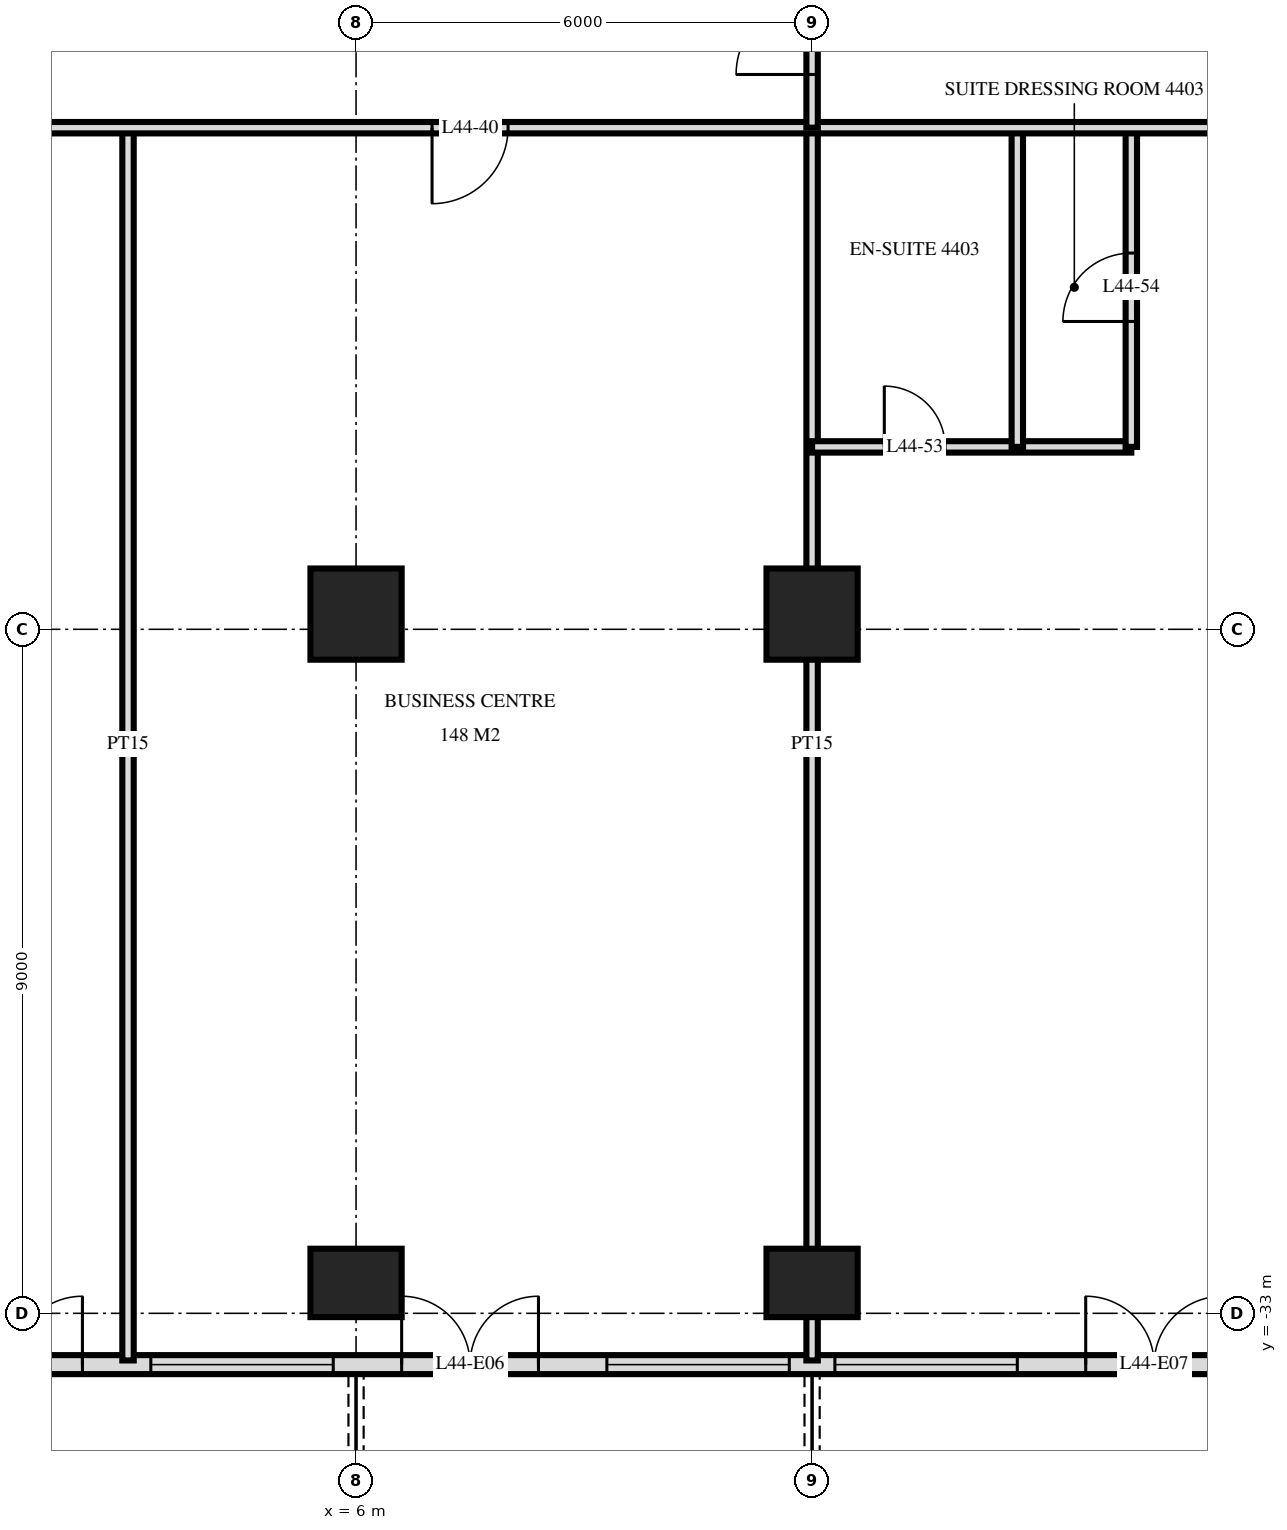
"""IFC4 building model, lengths in metres.
Left out: names, types, materials, properties, quantities, classifications, styles, units other than length and angle.
Written with IfcOpenShell. Run it as: python <this file> out.ifc"""

import sys

from ifc_helpers import new_model, si_unit, direction, frame, frame_2d, origin, origin_2d, place, context, subcontext, project, spatial, rectangle, extrude, element, fill, save


model = new_model("IFC4")
c1 = context("Model", 3, precision=1e-05, world=origin(), true_north=direction((0.0, 1.0)))
c2 = subcontext(c1, "Body", "Model", "MODEL_VIEW")
j1 = project(units=[si_unit("LENGTHUNIT", "METRE"), si_unit("PLANEANGLEUNIT", "RADIAN")], contexts=[c1])
p1 = place(None, origin())
s1 = spatial("IfcSite", under=j1, at=p1, CompositionType="ELEMENT")
p2 = place(p1, origin())
s2 = spatial("IfcBuilding", under=s1, at=p2, CompositionType="ELEMENT")
p3 = place(p2, frame((0.0, 0.0, 170.4)))
s3 = spatial("IfcBuildingStorey", under=s2, at=p3, CompositionType="ELEMENT", Elevation=170.4)
p4 = place(p3, frame((6.0, -32.6, 0.0), z_axis=(0.0, 0.0, 1.0), x_axis=(1.0, 0.0, 0.0)))
e1 = element("IfcColumn", 1, at=p4, inside=s3, PredefinedType="COLUMN", context=c2, shape_type="SweptSolid", body=[
    extrude(rectangle(XDim=1.2, YDim=0.9, at=origin_2d()), origin(), (0.0, 0.0, 1.0), 3.6),
])
p5 = place(p3, frame((6.0, -23.8, 0.0), z_axis=(0.0, 0.0, 1.0), x_axis=(1.0, 0.0, 0.0)))
e2 = element("IfcColumn", 2, at=p5, inside=s3, PredefinedType="COLUMN", context=c2, shape_type="SweptSolid", body=[
    extrude(rectangle(XDim=1.2, YDim=1.2, at=origin_2d()), origin(), (0.0, 0.0, 1.0), 3.6),
])
p6 = place(p3, frame((12.0, -32.6, 0.0), z_axis=(0.0, 0.0, 1.0), x_axis=(1.0, 0.0, 0.0)))
e3 = element("IfcColumn", 3, at=p6, inside=s3, PredefinedType="COLUMN", context=c2, shape_type="SweptSolid", body=[
    extrude(rectangle(XDim=1.2, YDim=0.9, at=origin_2d()), origin(), (0.0, 0.0, 1.0), 3.6),
])
p7 = place(p3, frame((12.0, -23.8, 0.0), z_axis=(0.0, 0.0, 1.0), x_axis=(1.0, 0.0, 0.0)))
e4 = element("IfcColumn", 4, at=p7, inside=s3, PredefinedType="COLUMN", context=c2, shape_type="SweptSolid", body=[
    extrude(rectangle(XDim=1.2, YDim=1.2, at=origin_2d()), origin(), (0.0, 0.0, 1.0), 3.6),
])
p8 = place(p3, frame((-23.675, -33.675, 0.0), z_axis=(0.0, 0.0, 1.0), x_axis=(1.0, 0.0, 0.0)))
e5 = element("IfcWall", 5, at=p8, inside=s3, PredefinedType="SOLIDWALL", context=c2, shape_type="SweptSolid", body=[
    extrude(rectangle(XDim=47.351, YDim=0.25, at=frame_2d((23.675, 0.0))), origin(), (0.0, 0.0, 1.0), 3.32),
])
p9 = place(p8, frame((0.575, 0.0, 0.0)))
e6 = element("IfcOpeningElement", 6, at=p9, cuts=e5, PredefinedType="OPENING", context=c2, shape_type="SweptSolid", body=[
    extrude(rectangle(XDim=1.8, YDim=2.4, at=frame_2d((0.9, 1.2))), frame((0.0, 0.135, 0.0), z_axis=(0.0, -1.0, 0.0), x_axis=(1.0, 0.0, 0.0)), (0.0, 0.0, 1.0), 0.27),
])
p10 = place(p8, frame((3.425, 0.0, 0.3)))
e7 = element("IfcOpeningElement", 7, at=p10, cuts=e5, PredefinedType="OPENING", context=c2, shape_type="SweptSolid", body=[
    extrude(rectangle(XDim=1.8, YDim=2.1, at=frame_2d((0.9, 1.05))), frame((0.0, 0.135, 0.0), z_axis=(0.0, -1.0, 0.0), x_axis=(1.0, 0.0, 0.0)), (0.0, 0.0, 1.0), 0.27),
])
p11 = place(p8, frame((5.975, 0.0, 0.3)))
e8 = element("IfcOpeningElement", 8, at=p11, cuts=e5, PredefinedType="OPENING", context=c2, shape_type="SweptSolid", body=[
    extrude(rectangle(XDim=2.4, YDim=2.1, at=frame_2d((1.2, 1.05))), frame((0.0, 0.135, 0.0), z_axis=(0.0, -1.0, 0.0), x_axis=(1.0, 0.0, 0.0)), (0.0, 0.0, 1.0), 0.27),
])
p12 = place(p8, frame((9.275, 0.0, 0.0)))
e9 = element("IfcOpeningElement", 9, at=p12, cuts=e5, PredefinedType="OPENING", context=c2, shape_type="SweptSolid", body=[
    extrude(rectangle(XDim=1.8, YDim=2.4, at=frame_2d((0.9, 1.2))), frame((0.0, 0.135, 0.0), z_axis=(0.0, -1.0, 0.0), x_axis=(1.0, 0.0, 0.0)), (0.0, 0.0, 1.0), 0.27),
])
p13 = place(p8, frame((12.275, 0.0, 0.0)))
e10 = element("IfcOpeningElement", 10, at=p13, cuts=e5, PredefinedType="OPENING", context=c2, shape_type="SweptSolid", body=[
    extrude(rectangle(XDim=1.8, YDim=2.4, at=frame_2d((0.9, 1.2))), frame((0.0, 0.135, 0.0), z_axis=(0.0, -1.0, 0.0), x_axis=(1.0, 0.0, 0.0)), (0.0, 0.0, 1.0), 0.27),
])
p14 = place(p8, frame((14.975, 0.0, 0.3)))
e11 = element("IfcOpeningElement", 11, at=p14, cuts=e5, PredefinedType="OPENING", context=c2, shape_type="SweptSolid", body=[
    extrude(rectangle(XDim=2.4, YDim=2.1, at=frame_2d((1.2, 1.05))), frame((0.0, 0.135, 0.0), z_axis=(0.0, -1.0, 0.0), x_axis=(1.0, 0.0, 0.0)), (0.0, 0.0, 1.0), 0.27),
])
p15 = place(p8, frame((17.975, 0.0, 0.3)))
e12 = element("IfcOpeningElement", 12, at=p15, cuts=e5, PredefinedType="OPENING", context=c2, shape_type="SweptSolid", body=[
    extrude(rectangle(XDim=2.4, YDim=2.1, at=frame_2d((1.2, 1.05))), frame((0.0, 0.135, 0.0), z_axis=(0.0, -1.0, 0.0), x_axis=(1.0, 0.0, 0.0)), (0.0, 0.0, 1.0), 0.27),
])
p16 = place(p8, frame((21.275, 0.0, 0.0)))
e13 = element("IfcOpeningElement", 13, at=p16, cuts=e5, PredefinedType="OPENING", context=c2, shape_type="SweptSolid", body=[
    extrude(rectangle(XDim=1.8, YDim=2.4, at=frame_2d((0.9, 1.2))), frame((0.0, 0.135, 0.0), z_axis=(0.0, -1.0, 0.0), x_axis=(1.0, 0.0, 0.0)), (0.0, 0.0, 1.0), 0.27),
])
p17 = place(p8, frame((24.275, 0.0, 0.0)))
e14 = element("IfcOpeningElement", 14, at=p17, cuts=e5, PredefinedType="OPENING", context=c2, shape_type="SweptSolid", body=[
    extrude(rectangle(XDim=1.8, YDim=2.4, at=frame_2d((0.9, 1.2))), frame((0.0, 0.135, 0.0), z_axis=(0.0, -1.0, 0.0), x_axis=(1.0, 0.0, 0.0)), (0.0, 0.0, 1.0), 0.27),
])
p18 = place(p8, frame((26.975, 0.0, 0.3)))
e15 = element("IfcOpeningElement", 15, at=p18, cuts=e5, PredefinedType="OPENING", context=c2, shape_type="SweptSolid", body=[
    extrude(rectangle(XDim=2.4, YDim=2.1, at=frame_2d((1.2, 1.05))), frame((0.0, 0.135, 0.0), z_axis=(0.0, -1.0, 0.0), x_axis=(1.0, 0.0, 0.0)), (0.0, 0.0, 1.0), 0.27),
])
p19 = place(p8, frame((30.275, 0.0, 0.0)))
e16 = element("IfcOpeningElement", 16, at=p19, cuts=e5, PredefinedType="OPENING", context=c2, shape_type="SweptSolid", body=[
    extrude(rectangle(XDim=1.8, YDim=2.4, at=frame_2d((0.9, 1.2))), frame((0.0, 0.135, 0.0), z_axis=(0.0, -1.0, 0.0), x_axis=(1.0, 0.0, 0.0)), (0.0, 0.0, 1.0), 0.27),
])
p20 = place(p8, frame((32.975, 0.0, 0.3)))
e17 = element("IfcOpeningElement", 17, at=p20, cuts=e5, PredefinedType="OPENING", context=c2, shape_type="SweptSolid", body=[
    extrude(rectangle(XDim=2.4, YDim=2.1, at=frame_2d((1.2, 1.05))), frame((0.0, 0.135, 0.0), z_axis=(0.0, -1.0, 0.0), x_axis=(1.0, 0.0, 0.0)), (0.0, 0.0, 1.0), 0.27),
])
p21 = place(p8, frame((35.975, 0.0, 0.3)))
e18 = element("IfcOpeningElement", 18, at=p21, cuts=e5, PredefinedType="OPENING", context=c2, shape_type="SweptSolid", body=[
    extrude(rectangle(XDim=2.4, YDim=2.1, at=frame_2d((1.2, 1.05))), frame((0.0, 0.135, 0.0), z_axis=(0.0, -1.0, 0.0), x_axis=(1.0, 0.0, 0.0)), (0.0, 0.0, 1.0), 0.27),
])
p22 = place(p8, frame((39.275, 0.0, 0.0)))
e19 = element("IfcOpeningElement", 19, at=p22, cuts=e5, PredefinedType="OPENING", context=c2, shape_type="SweptSolid", body=[
    extrude(rectangle(XDim=1.8, YDim=2.4, at=frame_2d((0.9, 1.2))), frame((0.0, 0.135, 0.0), z_axis=(0.0, -1.0, 0.0), x_axis=(1.0, 0.0, 0.0)), (0.0, 0.0, 1.0), 0.27),
])
p23 = place(p8, frame((42.275, 0.0, 0.0)))
e20 = element("IfcOpeningElement", 20, at=p23, cuts=e5, PredefinedType="OPENING", context=c2, shape_type="SweptSolid", body=[
    extrude(rectangle(XDim=1.8, YDim=2.4, at=frame_2d((0.9, 1.2))), frame((0.0, 0.135, 0.0), z_axis=(0.0, -1.0, 0.0), x_axis=(1.0, 0.0, 0.0)), (0.0, 0.0, 1.0), 0.27),
])
p24 = place(p8, frame((45.125, 0.0, 0.3)))
e21 = element("IfcOpeningElement", 21, at=p24, cuts=e5, PredefinedType="OPENING", context=c2, shape_type="SweptSolid", body=[
    extrude(rectangle(XDim=1.8, YDim=2.1, at=frame_2d((0.9, 1.05))), frame((0.0, 0.135, 0.0), z_axis=(0.0, -1.0, 0.0), x_axis=(1.0, 0.0, 0.0)), (0.0, 0.0, 1.0), 0.27),
])
p25 = place(p3, frame((16.2, -21.6, 0.0), z_axis=(0.0, 0.0, 1.0), x_axis=(0.0, 1.0, 0.0)))
e22 = element("IfcWall", 22, at=p25, inside=s3, PredefinedType="PARTITIONING", context=c2, shape_type="SweptSolid", body=[
    extrude(rectangle(XDim=4.2, YDim=0.15, at=frame_2d((2.1, 0.0))), origin(), (0.0, 0.0, 1.0), 3.32),
])
p26 = place(p25, frame((1.65, 0.0, 0.0)))
e23 = element("IfcOpeningElement", 23, at=p26, cuts=e22, PredefinedType="OPENING", context=c2, shape_type="SweptSolid", body=[
    extrude(rectangle(XDim=0.9, YDim=2.1, at=frame_2d((0.45, 1.05))), frame((0.0, 0.085, 0.0), z_axis=(0.0, -1.0, 0.0), x_axis=(1.0, 0.0, 0.0)), (0.0, 0.0, 1.0), 0.17),
])
p27 = place(p3, frame((14.7, -21.6, 0.0), z_axis=(0.0, 0.0, 1.0), x_axis=(0.0, 1.0, 0.0)))
e24 = element("IfcWall", 24, at=p27, inside=s3, PredefinedType="PARTITIONING", context=c2, shape_type="SweptSolid", body=[
    extrude(rectangle(XDim=4.2, YDim=0.15, at=frame_2d((2.1, 0.0))), origin(), (0.0, 0.0, 1.0), 3.32),
])
p28 = place(p3, frame((12.0, -17.4, 0.0), z_axis=(0.0, 0.0, 1.0), x_axis=(0.0, 1.0, 0.0)))
e25 = element("IfcWall", 25, at=p28, inside=s3, PredefinedType="PARTITIONING", context=c2, shape_type="SweptSolid", body=[
    extrude(rectangle(XDim=2.35, YDim=0.15, at=frame_2d((1.175, 0.0))), origin(), (0.0, 0.0, 1.0), 3.32),
])
p29 = place(p28, frame((0.7, 0.0, 0.0)))
e26 = element("IfcOpeningElement", 26, at=p29, cuts=e25, PredefinedType="OPENING", context=c2, shape_type="SweptSolid", body=[
    extrude(rectangle(XDim=1.0, YDim=2.1, at=frame_2d((0.5, 1.05))), frame((0.0, 0.085, 0.0), z_axis=(0.0, -1.0, 0.0), x_axis=(1.0, 0.0, 0.0)), (0.0, 0.0, 1.0), 0.17),
])
for number, where, z_axis, x_axis in (
    (27, (12.0, -33.62, 0.0), (0.0, 0.0, 1.0), (0.0, 1.0, 0.0)),
    (28, (3.0, -33.62, 0.0), (0.0, 0.0, 1.0), (0.0, 1.0, 0.0)),
):
    element("IfcWall", number, at=place(p3, frame(where, z_axis=z_axis, x_axis=x_axis)), inside=s3, PredefinedType="PARTITIONING", context=c2, shape_type="SweptSolid", body=[
        extrude(rectangle(XDim=16.22, YDim=0.15, at=frame_2d((8.11, 0.0))), origin(), (0.0, 0.0, 1.0), 3.32),
    ])
p30 = place(p3, frame((12.0, -21.6, 0.0), z_axis=(0.0, 0.0, 1.0), x_axis=(1.0, 0.0, 0.0)))
e29 = element("IfcWall", 29, at=p30, inside=s3, PredefinedType="PARTITIONING", context=c2, shape_type="SweptSolid", body=[
    extrude(rectangle(XDim=4.2, YDim=0.15, at=frame_2d((2.1, 0.0))), origin(), (0.0, 0.0, 1.0), 3.32),
])
p31 = place(p30, frame((0.95, 0.0, 0.0)))
e30 = element("IfcOpeningElement", 30, at=p31, cuts=e29, PredefinedType="OPENING", context=c2, shape_type="SweptSolid", body=[
    extrude(rectangle(XDim=0.8, YDim=2.1, at=frame_2d((0.4, 1.05))), frame((0.0, 0.085, 0.0), z_axis=(0.0, -1.0, 0.0), x_axis=(1.0, 0.0, 0.0)), (0.0, 0.0, 1.0), 0.17),
])
p32 = place(p3, frame((-28.02, -17.4, 0.0), z_axis=(0.0, 0.0, 1.0), x_axis=(1.0, 0.0, 0.0)))
e31 = element("IfcWall", 31, at=p32, inside=s3, PredefinedType="PARTITIONING", context=c2, shape_type="SweptSolid", body=[
    extrude(rectangle(XDim=56.04, YDim=0.15, at=frame_2d((28.02, 0.0))), origin(), (0.0, 0.0, 1.0), 3.32),
])
p33 = place(p32, frame((10.42, 0.0, 0.0)))
e32 = element("IfcOpeningElement", 32, at=p33, cuts=e31, PredefinedType="OPENING", context=c2, shape_type="SweptSolid", body=[
    extrude(rectangle(XDim=1.0, YDim=2.1, at=frame_2d((0.5, 1.05))), frame((0.0, 0.085, 0.0), z_axis=(0.0, -1.0, 0.0), x_axis=(1.0, 0.0, 0.0)), (0.0, 0.0, 1.0), 0.17),
])
p34 = place(p32, frame((2.32, 0.0, 0.0)))
e33 = element("IfcOpeningElement", 33, at=p34, cuts=e31, PredefinedType="OPENING", context=c2, shape_type="SweptSolid", body=[
    extrude(rectangle(XDim=1.0, YDim=2.1, at=frame_2d((0.5, 1.05))), frame((0.0, 0.085, 0.0), z_axis=(0.0, -1.0, 0.0), x_axis=(1.0, 0.0, 0.0)), (0.0, 0.0, 1.0), 0.17),
])
p35 = place(p32, frame((49.72, 0.0, 0.0)))
e34 = element("IfcOpeningElement", 34, at=p35, cuts=e31, PredefinedType="OPENING", context=c2, shape_type="SweptSolid", body=[
    extrude(rectangle(XDim=1.0, YDim=2.1, at=frame_2d((0.5, 1.05))), frame((0.0, 0.085, 0.0), z_axis=(0.0, -1.0, 0.0), x_axis=(1.0, 0.0, 0.0)), (0.0, 0.0, 1.0), 0.17),
])
p36 = place(p32, frame((23.02, 0.0, 0.0)))
e35 = element("IfcOpeningElement", 35, at=p36, cuts=e31, PredefinedType="OPENING", context=c2, shape_type="SweptSolid", body=[
    extrude(rectangle(XDim=1.0, YDim=2.1, at=frame_2d((0.5, 1.05))), frame((0.0, 0.085, 0.0), z_axis=(0.0, -1.0, 0.0), x_axis=(1.0, 0.0, 0.0)), (0.0, 0.0, 1.0), 0.17),
])
p37 = place(p32, frame((35.02, 0.0, 0.0)))
e36 = element("IfcOpeningElement", 36, at=p37, cuts=e31, PredefinedType="OPENING", context=c2, shape_type="SweptSolid", body=[
    extrude(rectangle(XDim=1.0, YDim=2.1, at=frame_2d((0.5, 1.05))), frame((0.0, 0.085, 0.0), z_axis=(0.0, -1.0, 0.0), x_axis=(1.0, 0.0, 0.0)), (0.0, 0.0, 1.0), 0.17),
])
p38 = place(p17, origin())
e37 = element("IfcDoor", 37, at=p38, inside=s3, OperationType="DOUBLE_DOOR_SINGLE_SWING", PredefinedType="DOOR", context=c2, shape_type="SweptSolid", body=[
    extrude(rectangle(XDim=1.8, YDim=2.4, at=frame_2d((0.9, 1.2))), frame((0.0, 0.025, 0.0), z_axis=(0.0, -1.0, 0.0), x_axis=(1.0, 0.0, 0.0)), (0.0, 0.0, 1.0), 0.05),
])
fill(e14, e37)
p39 = place(p18, origin())
e38 = element("IfcWindow", 38, at=p39, inside=s3, PartitioningType="SINGLE_PANEL", PredefinedType="WINDOW", context=c2, shape_type="SweptSolid", body=[
    extrude(rectangle(XDim=2.4, YDim=2.1, at=frame_2d((1.2, 1.05))), frame((0.0, 0.03, 0.0), z_axis=(0.0, -1.0, 0.0), x_axis=(1.0, 0.0, 0.0)), (0.0, 0.0, 1.0), 0.06),
])
fill(e15, e38)
p40 = place(p19, origin())
e39 = element("IfcDoor", 39, at=p40, inside=s3, OperationType="DOUBLE_DOOR_SINGLE_SWING", PredefinedType="DOOR", context=c2, shape_type="SweptSolid", body=[
    extrude(rectangle(XDim=1.8, YDim=2.4, at=frame_2d((0.9, 1.2))), frame((0.0, 0.025, 0.0), z_axis=(0.0, -1.0, 0.0), x_axis=(1.0, 0.0, 0.0)), (0.0, 0.0, 1.0), 0.05),
])
fill(e16, e39)
p41 = place(p20, origin())
e40 = element("IfcWindow", 40, at=p41, inside=s3, PartitioningType="SINGLE_PANEL", PredefinedType="WINDOW", context=c2, shape_type="SweptSolid", body=[
    extrude(rectangle(XDim=2.4, YDim=2.1, at=frame_2d((1.2, 1.05))), frame((0.0, 0.03, 0.0), z_axis=(0.0, -1.0, 0.0), x_axis=(1.0, 0.0, 0.0)), (0.0, 0.0, 1.0), 0.06),
])
fill(e17, e40)
p42 = place(p21, origin())
e41 = element("IfcWindow", 41, at=p42, inside=s3, PartitioningType="SINGLE_PANEL", PredefinedType="WINDOW", context=c2, shape_type="SweptSolid", body=[
    extrude(rectangle(XDim=2.4, YDim=2.1, at=frame_2d((1.2, 1.05))), frame((0.0, 0.03, 0.0), z_axis=(0.0, -1.0, 0.0), x_axis=(1.0, 0.0, 0.0)), (0.0, 0.0, 1.0), 0.06),
])
fill(e18, e41)
p43 = place(p22, origin())
e42 = element("IfcDoor", 42, at=p43, inside=s3, OperationType="DOUBLE_DOOR_SINGLE_SWING", PredefinedType="DOOR", context=c2, shape_type="SweptSolid", body=[
    extrude(rectangle(XDim=1.8, YDim=2.4, at=frame_2d((0.9, 1.2))), frame((0.0, 0.025, 0.0), z_axis=(0.0, -1.0, 0.0), x_axis=(1.0, 0.0, 0.0)), (0.0, 0.0, 1.0), 0.05),
])
fill(e19, e42)
p44 = place(p29, origin())
e43 = element("IfcDoor", 43, at=p44, inside=s3, OperationType="SINGLE_SWING_RIGHT", PredefinedType="DOOR", context=c2, shape_type="SweptSolid", body=[
    extrude(rectangle(XDim=1.0, YDim=2.1, at=frame_2d((0.5, 1.05))), frame((0.0, 0.025, 0.0), z_axis=(0.0, -1.0, 0.0), x_axis=(1.0, 0.0, 0.0)), (0.0, 0.0, 1.0), 0.05),
])
fill(e26, e43)
p45 = place(p37, frame((0.5, 0.0, 0.0), z_axis=(0.0, 0.0, 1.0), x_axis=(-1.0, 0.0, 0.0)))
e44 = element("IfcDoor", 44, at=p45, inside=s3, OperationType="SINGLE_SWING_LEFT", PredefinedType="DOOR", context=c2, shape_type="SweptSolid", body=[
    extrude(rectangle(XDim=1.0, YDim=2.1, at=frame_2d((0.0, 1.05))), frame((0.0, -0.025, 0.0), z_axis=(0.0, 1.0, 0.0), x_axis=(-1.0, 0.0, 0.0)), (0.0, 0.0, 1.0), 0.05),
])
fill(e36, e44)
p46 = place(p31, origin())
e45 = element("IfcDoor", 45, at=p46, inside=s3, OperationType="SINGLE_SWING_RIGHT", PredefinedType="DOOR", context=c2, shape_type="SweptSolid", body=[
    extrude(rectangle(XDim=0.8, YDim=2.1, at=frame_2d((0.4, 1.05))), frame((0.0, 0.025, 0.0), z_axis=(0.0, -1.0, 0.0), x_axis=(1.0, 0.0, 0.0)), (0.0, 0.0, 1.0), 0.05),
])
fill(e30, e45)
p47 = place(p26, origin())
e46 = element("IfcDoor", 46, at=p47, inside=s3, OperationType="SINGLE_SWING_RIGHT", PredefinedType="DOOR", context=c2, shape_type="SweptSolid", body=[
    extrude(rectangle(XDim=0.9, YDim=2.1, at=frame_2d((0.45, 1.05))), frame((0.0, 0.025, 0.0), z_axis=(0.0, -1.0, 0.0), x_axis=(1.0, 0.0, 0.0)), (0.0, 0.0, 1.0), 0.05),
])
fill(e23, e46)
save(model, sys.argv[1])
